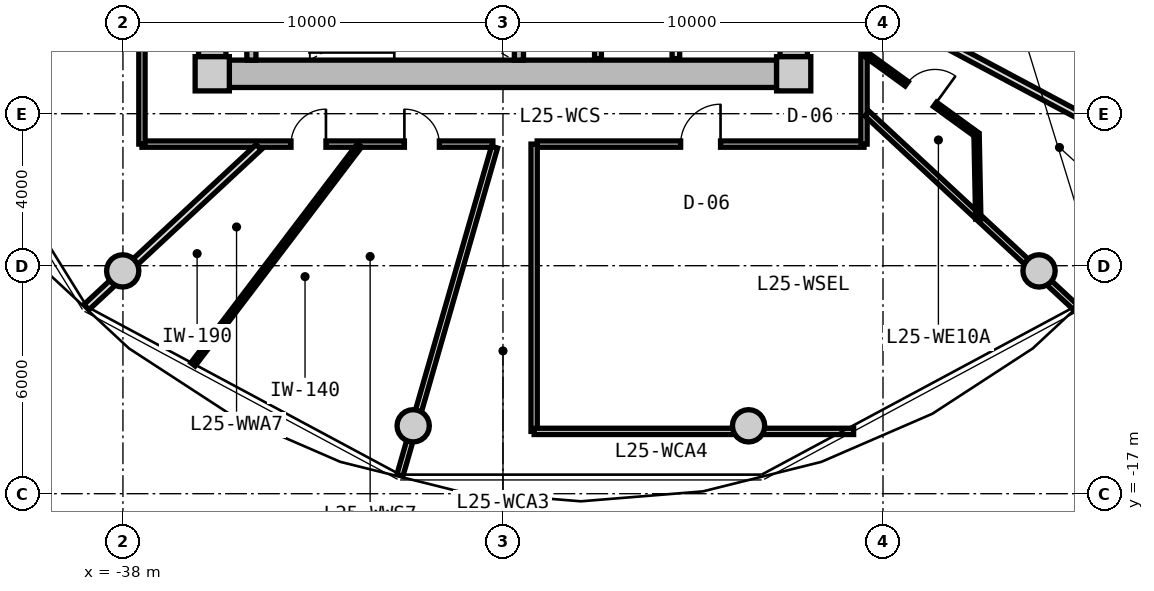
"""IFC4 building model, lengths in metres.
Left out: names, types, materials, properties, quantities, classifications, styles, units other than length and angle.
Written with IfcOpenShell. Run it as: python <this file> out.ifc"""

import sys

from ifc_helpers import new_model, si_unit, direction, frame, frame_2d, origin, origin_2d, place, context, subcontext, project, spatial, rectangle, circle, extrude, source, transform, mapped, element, fill, save


model = new_model("IFC4")
c1 = context("Model", 3, precision=1e-05, world=origin(), true_north=direction((0.0, 1.0)))
c2 = subcontext(c1, "Body", "Model", "MODEL_VIEW")
j1 = project(units=[si_unit("LENGTHUNIT", "METRE"), si_unit("PLANEANGLEUNIT", "RADIAN")], contexts=[c1])
p1 = place(None, origin())
s1 = spatial("IfcSite", under=j1, at=p1, CompositionType="ELEMENT")
p2 = place(p1, origin())
s2 = spatial("IfcBuilding", under=s1, at=p2, CompositionType="ELEMENT")
p3 = place(p2, frame((0.0, 0.0, 84.05)))
s3 = spatial("IfcBuildingStorey", under=s2, at=p3, CompositionType="ELEMENT", Elevation=84.05)
m1 = source(origin(), c2, "Body", "SweptSolid", [
    extrude(rectangle(XDim=0.9, YDim=0.9, at=origin_2d()), origin(), (0.0, 0.0, 1.0), 3.05),
])
for number, where, z_axis, x_axis in (
    (1, (-35.65, -5.95, 0.0), (0.0, 0.0, 1.0), (1.0, 0.0, 0.0)),
    (2, (-20.35, -5.95, 0.0), (0.0, 0.0, 1.0), (1.0, 0.0, 0.0)),
):
    element("IfcColumn", number, at=place(p3, frame(where, z_axis=z_axis, x_axis=x_axis)), inside=s3, PredefinedType="COLUMN", context=c2, shape_type="MappedRepresentation", body=[
        mapped(m1, transform((0.0, 0.0, 0.0), x_axis=(1.0, 0.0, 0.0), y_axis=(0.0, 1.0, 0.0), z_axis=(0.0, 0.0, 1.0), scale=1.0)),
    ])
m2 = source(origin(), c2, "Body", "SweptSolid", [
    extrude(rectangle(XDim=14.4, YDim=0.72, at=frame_2d((7.2, 0.0))), origin(), (0.0, 0.0, 1.0), 2.79),
])
p4 = place(p3, frame((-20.8, -5.95, 0.0), z_axis=(0.0, 0.0, 1.0), x_axis=(-1.0, 0.0, 0.0)))
e3 = element("IfcWall", 3, at=p4, inside=s3, PredefinedType="SHEAR", context=c2, shape_type="MappedRepresentation", body=[
    mapped(m2, transform((0.0, 0.0, 0.0), x_axis=(1.0, 0.0, 0.0), y_axis=(0.0, 1.0, 0.0), z_axis=(0.0, 0.0, 1.0), scale=1.0)),
])
m3 = source(origin(), c2, "Body", "SweptSolid", [
    extrude(rectangle(XDim=11.0, YDim=0.72, at=frame_2d((5.5, 0.0))), origin(), (0.0, 0.0, 1.0), 2.79),
])
p5 = place(p3, frame((-35.65, -5.5, 0.0), z_axis=(0.0, 0.0, 1.0), x_axis=(0.0, 1.0, 0.0)))
e4 = element("IfcWall", 4, at=p5, inside=s3, PredefinedType="SHEAR", context=c2, shape_type="MappedRepresentation", body=[
    mapped(m3, transform((0.0, 0.0, 0.0), x_axis=(1.0, 0.0, 0.0), y_axis=(0.0, 1.0, 0.0), z_axis=(0.0, 0.0, 1.0), scale=1.0)),
])
p6 = place(p5, frame((3.8, 0.0, 0.0)))
e5 = element("IfcOpeningElement", 5, at=p6, cuts=e4, PredefinedType="OPENING", context=c2, shape_type="SweptSolid", body=[
    extrude(rectangle(XDim=1.2, YDim=2.15, at=frame_2d((0.6, 1.075))), frame((0.0, 0.37, 0.0), z_axis=(0.0, -1.0, 0.0), x_axis=(1.0, 0.0, 0.0)), (0.0, 0.0, 1.0), 0.74),
])
p7 = place(p3, frame((-20.35, 5.5, 0.0), z_axis=(0.0, 0.0, 1.0), x_axis=(0.0, -1.0, 0.0)))
e6 = element("IfcWall", 6, at=p7, inside=s3, PredefinedType="SHEAR", context=c2, shape_type="MappedRepresentation", body=[
    mapped(m3, transform((0.0, 0.0, 0.0), x_axis=(1.0, 0.0, 0.0), y_axis=(0.0, 1.0, 0.0), z_axis=(0.0, 0.0, 1.0), scale=1.0)),
])
p8 = place(p7, frame((5.65, 0.0, 0.0)))
e7 = element("IfcOpeningElement", 7, at=p8, cuts=e6, PredefinedType="OPENING", context=c2, shape_type="SweptSolid", body=[
    extrude(rectangle(XDim=1.2, YDim=2.15, at=frame_2d((0.6, 1.075))), frame((0.0, 0.37, 0.0), z_axis=(0.0, -1.0, 0.0), x_axis=(1.0, 0.0, 0.0)), (0.0, 0.0, 1.0), 0.74),
])
m4 = source(origin(), c2, "Body", "SweptSolid", [
    extrude(circle(Radius=0.425, at=origin_2d()), origin(), (0.0, 0.0, 1.0), 3.05),
])
for number, where, z_axis, x_axis in (
    (8, (-38.006, -11.137, 0.0), (0.0, 0.0, 1.0), (1.0, 0.0, 0.0)),
    (9, (-30.363, -15.213, 0.0), (0.0, 0.0, 1.0), (1.0, 0.0, 0.0)),
    (10, (-21.537, -15.213, 0.0), (0.0, 0.0, 1.0), (1.0, 0.0, 0.0)),
    (11, (-13.894, -11.137, 0.0), (0.0, 0.0, 1.0), (1.0, 0.0, 0.0)),
):
    element("IfcColumn", number, at=place(p3, frame(where, z_axis=z_axis, x_axis=x_axis)), inside=s3, PredefinedType="COLUMN", context=c2, shape_type="MappedRepresentation", body=[
        mapped(m4, transform((0.0, 0.0, 0.0), x_axis=(1.0, 0.0, 0.0), y_axis=(0.0, 1.0, 0.0), z_axis=(0.0, 0.0, 1.0), scale=1.0)),
    ])
m5 = source(origin(), c2, "Body", "SweptSolid", [
    extrude(rectangle(XDim=3.14, YDim=0.24, at=frame_2d((1.57, 0.0))), origin(), (0.0, 0.0, 1.0), 2.79),
])
for number, where, z_axis, x_axis in (
    (12, (-34.62, -5.59, 0.0), (0.0, 0.0, 1.0), (0.0, 1.0, 0.0)),
    (13, (-27.58, -5.59, 0.0), (0.0, 0.0, 1.0), (0.0, 1.0, 0.0)),
):
    element("IfcWall", number, at=place(p3, frame(where, z_axis=z_axis, x_axis=x_axis)), inside=s3, PredefinedType="PARTITIONING", context=c2, shape_type="MappedRepresentation", body=[
        mapped(m5, transform((0.0, 0.0, 0.0), x_axis=(1.0, 0.0, 0.0), y_axis=(0.0, 1.0, 0.0), z_axis=(0.0, 0.0, 1.0), scale=1.0)),
    ])
m6 = source(origin(), c2, "Body", "SweptSolid", [
    extrude(rectangle(XDim=3.8, YDim=0.2, at=frame_2d((1.9, 0.0))), origin(), (0.0, 0.0, 1.0), 2.775),
])
p9 = place(p3, frame((-23.45, -5.55, 0.0), z_axis=(0.0, 0.0, 1.0), x_axis=(0.0, 1.0, 0.0)))
e14 = element("IfcWall", 14, at=p9, inside=s3, PredefinedType="PARTITIONING", context=c2, shape_type="MappedRepresentation", body=[
    mapped(m6, transform((0.0, 0.0, 0.0), x_axis=(1.0, 0.0, 0.0), y_axis=(0.0, 1.0, 0.0), z_axis=(0.0, 0.0, 1.0), scale=1.0)),
])
m7 = source(origin(), c2, "Body", "SweptSolid", [
    extrude(rectangle(XDim=3.22, YDim=0.18, at=frame_2d((1.61, 0.0))), origin(), (0.0, 0.0, 1.0), 2.775),
])
p10 = place(p3, frame((-25.5, -5.55, 0.0), z_axis=(0.0, 0.0, 1.0), x_axis=(0.0, 1.0, 0.0)))
e15 = element("IfcWall", 15, at=p10, inside=s3, PredefinedType="PARTITIONING", context=c2, shape_type="MappedRepresentation", body=[
    mapped(m7, transform((0.0, 0.0, 0.0), x_axis=(1.0, 0.0, 0.0), y_axis=(0.0, 1.0, 0.0), z_axis=(0.0, 0.0, 1.0), scale=1.0)),
])
m8 = source(origin(), c2, "Body", "SweptSolid", [
    extrude(rectangle(XDim=8.6, YDim=0.165, at=frame_2d((4.3, 0.0))), origin(), (0.0, 0.0, 1.0), 2.775),
])
p11 = place(p3, frame((-18.5, -7.8, 0.0), z_axis=(0.0, 0.0, 1.0), x_axis=(-1.0, 0.0, 0.0)))
e16 = element("IfcWall", 16, at=p11, inside=s3, PredefinedType="PARTITIONING", context=c2, shape_type="MappedRepresentation", body=[
    mapped(m8, transform((0.0, 0.0, 0.0), x_axis=(1.0, 0.0, 0.0), y_axis=(0.0, 1.0, 0.0), z_axis=(0.0, 0.0, 1.0), scale=1.0)),
])
p12 = place(p11, frame((3.775, 0.0, 0.0)))
e17 = element("IfcOpeningElement", 17, at=p12, cuts=e16, PredefinedType="OPENING", context=c2, shape_type="SweptSolid", body=[
    extrude(rectangle(XDim=1.05, YDim=2.15, at=frame_2d((0.525, 1.075))), frame((0.0, 0.093, 0.0), z_axis=(0.0, -1.0, 0.0), x_axis=(1.0, 0.0, 0.0)), (0.0, 0.0, 1.0), 0.185),
])
m9 = source(origin(), c2, "Body", "SweptSolid", [
    extrude(rectangle(XDim=9.234, YDim=0.165, at=frame_2d((4.617, 0.0))), origin(), (0.0, 0.0, 1.0), 2.775),
])
p13 = place(p3, frame((-28.266, -7.8, 0.0), z_axis=(0.0, 0.0, 1.0), x_axis=(-1.0, 0.0, 0.0)))
e18 = element("IfcWall", 18, at=p13, inside=s3, PredefinedType="PARTITIONING", context=c2, shape_type="MappedRepresentation", body=[
    mapped(m9, transform((0.0, 0.0, 0.0), x_axis=(1.0, 0.0, 0.0), y_axis=(0.0, 1.0, 0.0), z_axis=(0.0, 0.0, 1.0), scale=1.0)),
])
p14 = place(p13, frame((4.392, 0.0, 0.0)))
e19 = element("IfcOpeningElement", 19, at=p14, cuts=e18, PredefinedType="OPENING", context=c2, shape_type="SweptSolid", body=[
    extrude(rectangle(XDim=0.92, YDim=2.1, at=frame_2d((0.46, 1.05))), frame((0.0, 0.093, 0.0), z_axis=(0.0, -1.0, 0.0), x_axis=(1.0, 0.0, 0.0)), (0.0, 0.0, 1.0), 0.185),
])
p15 = place(p13, frame((1.408, 0.0, 0.0)))
e20 = element("IfcOpeningElement", 20, at=p15, cuts=e18, PredefinedType="OPENING", context=c2, shape_type="SweptSolid", body=[
    extrude(rectangle(XDim=0.92, YDim=2.1, at=frame_2d((0.46, 1.05))), frame((0.0, 0.093, 0.0), z_axis=(0.0, -1.0, 0.0), x_axis=(1.0, 0.0, 0.0)), (0.0, 0.0, 1.0), 0.185),
])
m10 = source(origin(), c2, "Body", "SweptSolid", [
    extrude(rectangle(XDim=15.6, YDim=0.165, at=frame_2d((7.8, 0.0))), origin(), (0.0, 0.0, 1.0), 2.775),
])
p16 = place(p3, frame((-37.5, -7.8, 0.0), z_axis=(0.0, 0.0, 1.0), x_axis=(0.0, 1.0, 0.0)))
e21 = element("IfcWall", 21, at=p16, inside=s3, PredefinedType="PARTITIONING", context=c2, shape_type="MappedRepresentation", body=[
    mapped(m10, transform((0.0, 0.0, 0.0), x_axis=(1.0, 0.0, 0.0), y_axis=(0.0, 1.0, 0.0), z_axis=(0.0, 0.0, 1.0), scale=1.0)),
])
p17 = place(p16, frame((7.175, 0.0, 0.0)))
e22 = element("IfcOpeningElement", 22, at=p17, cuts=e21, PredefinedType="OPENING", context=c2, shape_type="SweptSolid", body=[
    extrude(rectangle(XDim=1.25, YDim=2.2, at=frame_2d((0.625, 1.1))), frame((0.0, 0.093, 0.0), z_axis=(0.0, -1.0, 0.0), x_axis=(1.0, 0.0, 0.0)), (0.0, 0.0, 1.0), 0.185),
])
p18 = place(p3, frame((-18.5, 7.8, 0.0), z_axis=(0.0, 0.0, 1.0), x_axis=(0.0, -1.0, 0.0)))
e23 = element("IfcWall", 23, at=p18, inside=s3, PredefinedType="PARTITIONING", context=c2, shape_type="MappedRepresentation", body=[
    mapped(m10, transform((0.0, 0.0, 0.0), x_axis=(1.0, 0.0, 0.0), y_axis=(0.0, 1.0, 0.0), z_axis=(0.0, 0.0, 1.0), scale=1.0)),
])
p19 = place(p18, frame((12.002, 0.0, 0.0)))
e24 = element("IfcOpeningElement", 24, at=p19, cuts=e23, PredefinedType="OPENING", context=c2, shape_type="SweptSolid", body=[
    extrude(rectangle(XDim=1.05, YDim=2.15, at=frame_2d((0.525, 1.075))), frame((0.0, 0.093, 0.0), z_axis=(0.0, -1.0, 0.0), x_axis=(1.0, 0.0, 0.0)), (0.0, 0.0, 1.0), 0.185),
])
p20 = place(p18, frame((10.211, 0.0, 0.0)))
e25 = element("IfcOpeningElement", 25, at=p20, cuts=e23, PredefinedType="OPENING", context=c2, shape_type="SweptSolid", body=[
    extrude(rectangle(XDim=1.05, YDim=2.15, at=frame_2d((0.525, 1.075))), frame((0.0, 0.093, 0.0), z_axis=(0.0, -1.0, 0.0), x_axis=(1.0, 0.0, 0.0)), (0.0, 0.0, 1.0), 0.185),
])
p21 = place(p18, frame((7.722, 0.0, 0.0)))
e26 = element("IfcOpeningElement", 26, at=p21, cuts=e23, PredefinedType="OPENING", context=c2, shape_type="SweptSolid", body=[
    extrude(rectangle(XDim=1.05, YDim=2.15, at=frame_2d((0.525, 1.075))), frame((0.0, 0.093, 0.0), z_axis=(0.0, -1.0, 0.0), x_axis=(1.0, 0.0, 0.0)), (0.0, 0.0, 1.0), 0.185),
])
p22 = place(p18, frame((6.291, 0.0, 0.0)))
e27 = element("IfcOpeningElement", 27, at=p22, cuts=e23, PredefinedType="OPENING", context=c2, shape_type="SweptSolid", body=[
    extrude(rectangle(XDim=1.05, YDim=2.15, at=frame_2d((0.525, 1.075))), frame((0.0, 0.093, 0.0), z_axis=(0.0, -1.0, 0.0), x_axis=(1.0, 0.0, 0.0)), (0.0, 0.0, 1.0), 0.185),
])
p23 = place(p18, frame((4.296, 0.0, 0.0)))
e28 = element("IfcOpeningElement", 28, at=p23, cuts=e23, PredefinedType="OPENING", context=c2, shape_type="SweptSolid", body=[
    extrude(rectangle(XDim=1.05, YDim=2.15, at=frame_2d((0.525, 1.075))), frame((0.0, 0.093, 0.0), z_axis=(0.0, -1.0, 0.0), x_axis=(1.0, 0.0, 0.0)), (0.0, 0.0, 1.0), 0.185),
])
p24 = place(p18, frame((1.654, 0.0, 0.0)))
e29 = element("IfcOpeningElement", 29, at=p24, cuts=e23, PredefinedType="OPENING", context=c2, shape_type="SweptSolid", body=[
    extrude(rectangle(XDim=1.05, YDim=2.15, at=frame_2d((0.525, 1.075))), frame((0.0, 0.093, 0.0), z_axis=(0.0, -1.0, 0.0), x_axis=(1.0, 0.0, 0.0)), (0.0, 0.0, 1.0), 0.185),
])
m11 = source(origin(), c2, "Body", "SweptSolid", [
    extrude(rectangle(XDim=8.989, YDim=0.165, at=frame_2d((4.495, 0.0))), origin(), (0.0, 0.0, 1.0), 2.275),
])
p25 = place(p3, frame((-28.222, -7.88, 0.0), z_axis=(0.0, 0.0, 1.0), x_axis=(-0.27702323008, -0.960863221274, 0.0)))
e30 = element("IfcWall", 30, at=p25, inside=s3, PredefinedType="PARTITIONING", context=c2, shape_type="MappedRepresentation", body=[
    mapped(m11, transform((0.0, 0.0, 0.0), x_axis=(1.0, 0.0, 0.0), y_axis=(0.0, 1.0, 0.0), z_axis=(0.0, 0.0, 1.0), scale=1.0)),
])
m12 = source(origin(), c2, "Body", "SweptSolid", [
    extrude(rectangle(XDim=7.482, YDim=0.165, at=frame_2d((3.741, 0.0))), origin(), (0.0, 0.0, 1.0), 2.275),
])
p26 = place(p3, frame((-18.42, -6.998, 0.0), z_axis=(0.0, 0.0, 1.0), x_axis=(0.732508698043, -0.680757671489, 0.0)))
e31 = element("IfcWall", 31, at=p26, inside=s3, PredefinedType="PARTITIONING", context=c2, shape_type="MappedRepresentation", body=[
    mapped(m12, transform((0.0, 0.0, 0.0), x_axis=(1.0, 0.0, 0.0), y_axis=(0.0, 1.0, 0.0), z_axis=(0.0, 0.0, 1.0), scale=1.0)),
])
m13 = source(origin(), c2, "Body", "SweptSolid", [
    extrude(rectangle(XDim=7.56, YDim=0.165, at=frame_2d((3.78, 0.0))), origin(), (0.0, 0.0, 1.0), 2.775),
])
p27 = place(p3, frame((-27.18, -15.36, 0.0), z_axis=(0.0, 0.0, 1.0), x_axis=(0.0, 1.0, 0.0)))
e32 = element("IfcWall", 32, at=p27, inside=s3, PredefinedType="PARTITIONING", context=c2, shape_type="MappedRepresentation", body=[
    mapped(m13, transform((0.0, 0.0, 0.0), x_axis=(1.0, 0.0, 0.0), y_axis=(0.0, 1.0, 0.0), z_axis=(0.0, 0.0, 1.0), scale=1.0)),
])
m14 = source(origin(), c2, "Body", "SweptSolid", [
    extrude(rectangle(XDim=8.407, YDim=0.165, at=frame_2d((4.204, 0.0))), origin(), (0.0, 0.0, 1.0), 2.275),
])
p28 = place(p3, frame((-27.18, -15.36, 0.0), z_axis=(0.0, 0.0, 1.0), x_axis=(1.0, 0.0, 0.0)))
e33 = element("IfcWall", 33, at=p28, inside=s3, PredefinedType="PARTITIONING", context=c2, shape_type="MappedRepresentation", body=[
    mapped(m14, transform((0.0, 0.0, 0.0), x_axis=(1.0, 0.0, 0.0), y_axis=(0.0, 1.0, 0.0), z_axis=(0.0, 0.0, 1.0), scale=1.0)),
])
m15 = source(origin(), c2, "Body", "SweptSolid", [
    extrude(rectangle(XDim=6.187, YDim=0.19, at=frame_2d((3.093, 0.0))), origin(), (0.0, 0.0, 1.0), 2.275),
])
p29 = place(p3, frame((-34.429, -7.88, 0.0), z_axis=(0.0, 0.0, 1.0), x_axis=(-0.732501077882, -0.680765870841, 0.0)))
e34 = element("IfcWall", 34, at=p29, inside=s3, PredefinedType="PARTITIONING", context=c2, shape_type="MappedRepresentation", body=[
    mapped(m15, transform((0.0, 0.0, 0.0), x_axis=(1.0, 0.0, 0.0), y_axis=(0.0, 1.0, 0.0), z_axis=(0.0, 0.0, 1.0), scale=1.0)),
])
m16 = source(origin(), c2, "Body", "SweptSolid", [
    extrude(rectangle(XDim=7.243, YDim=0.14, at=frame_2d((3.621, 0.0))), origin(), (0.0, 0.0, 1.0), 2.775),
])
p30 = place(p3, frame((-31.774, -7.83, 0.0), z_axis=(0.0, 0.0, 1.0), x_axis=(-0.605111472002, -0.796140757939, 0.0)))
e35 = element("IfcWall", 35, at=p30, inside=s3, PredefinedType="PARTITIONING", context=c2, shape_type="MappedRepresentation", body=[
    mapped(m16, transform((0.0, 0.0, 0.0), x_axis=(1.0, 0.0, 0.0), y_axis=(0.0, 1.0, 0.0), z_axis=(0.0, 0.0, 1.0), scale=1.0)),
])
m17 = source(origin(), c2, "Body", "SweptSolid", [
    extrude(rectangle(XDim=8.744, YDim=0.19, at=frame_2d((4.372, 0.0))), origin(), (0.0, 0.0, 1.0), 2.775),
])
p31 = place(p3, frame((-18.273, -4.142, 0.0), z_axis=(0.0, 0.0, 1.0), x_axis=(0.882252449936, -0.470776607938, 0.0)))
e36 = element("IfcWall", 36, at=p31, inside=s3, PredefinedType="PARTITIONING", context=c2, shape_type="MappedRepresentation", body=[
    mapped(m17, transform((0.0, 0.0, 0.0), x_axis=(1.0, 0.0, 0.0), y_axis=(0.0, 1.0, 0.0), z_axis=(0.0, 0.0, 1.0), scale=1.0)),
])
m18 = source(origin(), c2, "Body", "SweptSolid", [
    extrude(rectangle(XDim=3.621, YDim=0.14, at=frame_2d((1.811, 0.0))), origin(), (0.0, 0.0, 1.0), 2.775),
])
p32 = place(p3, frame((-18.47, -5.422, 0.0), z_axis=(0.0, 0.0, 1.0), x_axis=(0.80968252222, -0.586868139544, 0.0)))
e37 = element("IfcWall", 37, at=p32, inside=s3, PredefinedType="PARTITIONING", context=c2, shape_type="MappedRepresentation", body=[
    mapped(m18, transform((0.0, 0.0, 0.0), x_axis=(1.0, 0.0, 0.0), y_axis=(0.0, 1.0, 0.0), z_axis=(0.0, 0.0, 1.0), scale=1.0)),
])
p33 = place(p32, frame((1.351, 0.0, 0.0)))
e38 = element("IfcOpeningElement", 38, at=p33, cuts=e37, PredefinedType="OPENING", context=c2, shape_type="SweptSolid", body=[
    extrude(rectangle(XDim=0.92, YDim=2.1, at=frame_2d((0.46, 1.05))), frame((0.0, 0.08, 0.0), z_axis=(0.0, -1.0, 0.0), x_axis=(1.0, 0.0, 0.0)), (0.0, 0.0, 1.0), 0.16),
])
m19 = source(origin(), c2, "Body", "SweptSolid", [
    extrude(rectangle(XDim=2.225, YDim=0.14, at=frame_2d((1.112, 0.0))), origin(), (0.0, 0.0, 1.0), 2.775),
])
p34 = place(p3, frame((-15.538, -7.547, 0.0), z_axis=(0.0, 0.0, 1.0), x_axis=(0.019971869027, -0.999800542332, 0.0)))
e39 = element("IfcWall", 39, at=p34, inside=s3, PredefinedType="PARTITIONING", context=c2, shape_type="MappedRepresentation", body=[
    mapped(m19, transform((0.0, 0.0, 0.0), x_axis=(1.0, 0.0, 0.0), y_axis=(0.0, 1.0, 0.0), z_axis=(0.0, 0.0, 1.0), scale=1.0)),
])
m20 = source(origin(), c2, "Body", "SweptSolid", [
    extrude(rectangle(XDim=1.05, YDim=2.15, at=frame_2d((0.525, 1.075))), frame((0.0, 0.025, 0.0), z_axis=(0.0, -1.0, 0.0), x_axis=(1.0, 0.0, 0.0)), (0.0, 0.0, 1.0), 0.05),
])
p35 = place(p12, frame((1.05, 0.0, 0.0), z_axis=(0.0, 0.0, 1.0), x_axis=(-1.0, 0.0, 0.0)))
e40 = element("IfcDoor", 40, at=p35, inside=s3, OperationType="SINGLE_SWING_RIGHT", PredefinedType="DOOR", context=c2, shape_type="MappedRepresentation", body=[
    mapped(m20, transform((0.0, 0.0, 0.0), x_axis=(1.0, 0.0, 0.0), y_axis=(0.0, 1.0, 0.0), z_axis=(0.0, 0.0, 1.0), scale=1.0)),
])
fill(e17, e40)
m21 = source(origin(), c2, "Body", "SweptSolid", [
    extrude(rectangle(XDim=0.92, YDim=2.1, at=frame_2d((0.46, 1.05))), frame((0.0, 0.025, 0.0), z_axis=(0.0, -1.0, 0.0), x_axis=(1.0, 0.0, 0.0)), (0.0, 0.0, 1.0), 0.05),
])
p36 = place(p14, frame((0.92, 0.0, 0.0), z_axis=(0.0, 0.0, 1.0), x_axis=(-1.0, 0.0, 0.0)))
e41 = element("IfcDoor", 41, at=p36, inside=s3, OperationType="SINGLE_SWING_RIGHT", PredefinedType="DOOR", context=c2, shape_type="MappedRepresentation", body=[
    mapped(m21, transform((0.0, 0.0, 0.0), x_axis=(1.0, 0.0, 0.0), y_axis=(0.0, 1.0, 0.0), z_axis=(0.0, 0.0, 1.0), scale=1.0)),
])
fill(e19, e41)
p37 = place(p15, frame((0.92, 0.0, 0.0), z_axis=(0.0, 0.0, 1.0), x_axis=(-1.0, 0.0, 0.0)))
e42 = element("IfcDoor", 42, at=p37, inside=s3, OperationType="SINGLE_SWING_LEFT", PredefinedType="DOOR", context=c2, shape_type="MappedRepresentation", body=[
    mapped(m21, transform((0.0, 0.0, 0.0), x_axis=(1.0, 0.0, 0.0), y_axis=(0.0, 1.0, 0.0), z_axis=(0.0, 0.0, 1.0), scale=1.0)),
])
fill(e20, e42)
p38 = place(p33, origin())
e43 = element("IfcDoor", 43, at=p38, inside=s3, OperationType="SINGLE_SWING_RIGHT", PredefinedType="DOOR", context=c2, shape_type="MappedRepresentation", body=[
    mapped(m21, transform((0.0, 0.0, 0.0), x_axis=(1.0, 0.0, 0.0), y_axis=(0.0, 1.0, 0.0), z_axis=(0.0, 0.0, 1.0), scale=1.0)),
])
fill(e38, e43)
save(model, sys.argv[1])
